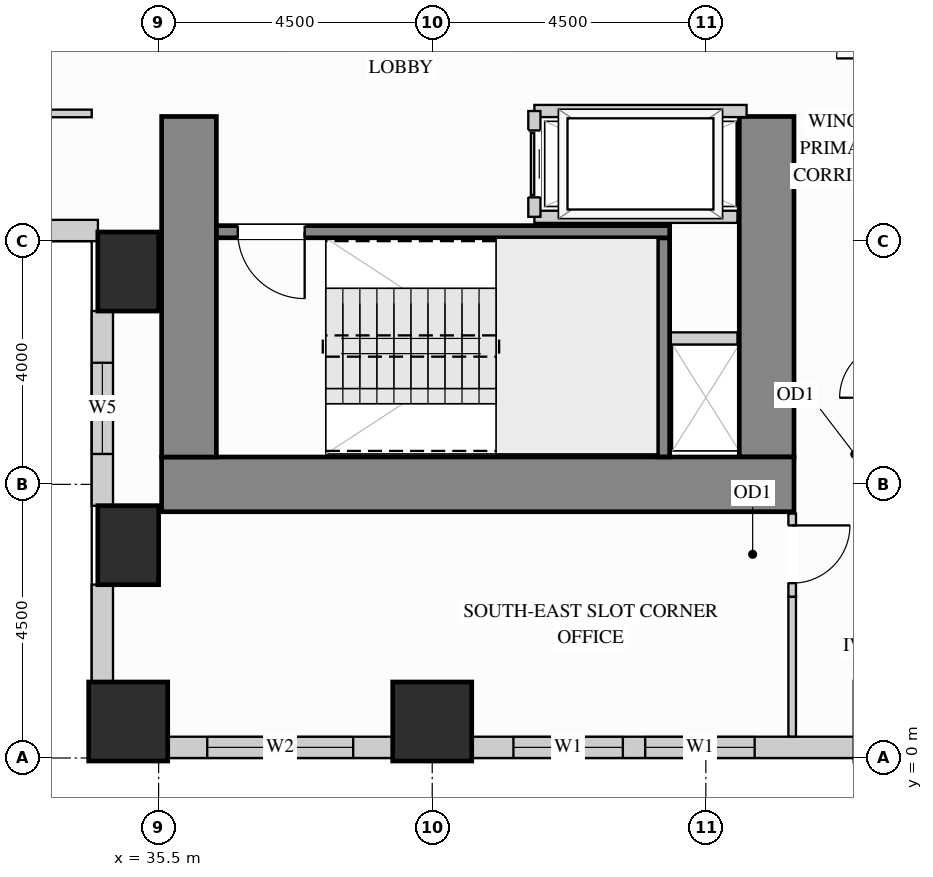
"""IFC4 building model, lengths in metres.
Left out: names, types, materials, properties, quantities, classifications, styles, units other than length and angle.
Written with IfcOpenShell. Run it as: python <this file> out.ifc"""

import sys

from ifc_helpers import new_model, si_unit, direction, frame, frame_2d, origin, origin_2d, place, context, subcontext, project, spatial, rectangle, extrude, source, transform, mapped, element, fill, save


model = new_model("IFC4")
c1 = context("Model", 3, precision=1e-05, world=origin(), true_north=direction((0.0, 1.0)))
c2 = subcontext(c1, "Body", "Model", "MODEL_VIEW")
j1 = project(units=[si_unit("LENGTHUNIT", "METRE"), si_unit("PLANEANGLEUNIT", "RADIAN")], contexts=[c1])
p1 = place(None, origin())
s1 = spatial("IfcSite", under=j1, at=p1, CompositionType="ELEMENT")
p2 = place(p1, origin())
s2 = spatial("IfcBuilding", under=s1, at=p2, CompositionType="ELEMENT")
p3 = place(p2, frame((0.0, 0.0, 22.5)))
s3 = spatial("IfcBuildingStorey", under=s2, at=p3, CompositionType="ELEMENT", Elevation=22.5)
m1 = source(origin(), c2, "Body", "SweptSolid", [
    extrude(rectangle(XDim=1.0, YDim=1.3, at=origin_2d()), origin(), (0.0, 0.0, 1.0), 3.38),
])
for number, where, z_axis, x_axis in (
    (1, (35.0, 3.5, 0.0), (0.0, 0.0, 1.0), (1.0, 0.0, 0.0)),
    (2, (35.0, 8.0, 0.0), (0.0, 0.0, 1.0), (1.0, 0.0, 0.0)),
):
    element("IfcColumn", number, at=place(p3, frame(where, z_axis=z_axis, x_axis=x_axis)), inside=s3, PredefinedType="COLUMN", context=c2, shape_type="MappedRepresentation", body=[
        mapped(m1, transform((0.0, 0.0, 0.0), x_axis=(1.0, 0.0, 0.0), y_axis=(0.0, 1.0, 0.0), z_axis=(0.0, 0.0, 1.0))),
    ])
m2 = source(origin(), c2, "Body", "SweptSolid", [
    extrude(rectangle(XDim=1.3, YDim=1.3, at=origin_2d()), origin(), (0.0, 0.0, 1.0), 3.38),
])
for number, where, z_axis, x_axis in (
    (3, (35.0, 0.6, 0.0), (0.0, 0.0, 1.0), (1.0, 0.0, 0.0)),
    (4, (40.0, 0.6, 0.0), (0.0, 0.0, 1.0), (1.0, 0.0, 0.0)),
):
    element("IfcColumn", number, at=place(p3, frame(where, z_axis=z_axis, x_axis=x_axis)), inside=s3, PredefinedType="COLUMN", context=c2, shape_type="MappedRepresentation", body=[
        mapped(m2, transform((0.0, 0.0, 0.0), x_axis=(1.0, 0.0, 0.0), y_axis=(0.0, 1.0, 0.0), z_axis=(0.0, 0.0, 1.0))),
    ])
m3 = source(origin(), c2, "Body", "SweptSolid", [
    extrude(rectangle(XDim=5.6, YDim=0.9, at=frame_2d((2.8, 0.0))), origin(), (0.0, 0.0, 1.0), 3.38),
])
p4 = place(p3, frame((45.5, 4.95, 0.0), z_axis=(0.0, 0.0, 1.0), x_axis=(0.0, 1.0, 0.0)))
e5 = element("IfcWall", 5, at=p4, inside=s3, PredefinedType="SHEAR", context=c2, shape_type="MappedRepresentation", body=[
    mapped(m3, transform((0.0, 0.0, 0.0), x_axis=(1.0, 0.0, 0.0), y_axis=(0.0, 1.0, 0.0), z_axis=(0.0, 0.0, 1.0))),
])
m4 = source(origin(), c2, "Body", "SweptSolid", [
    extrude(rectangle(XDim=10.4, YDim=0.9, at=frame_2d((5.2, 0.0))), origin(), (0.0, 0.0, 1.0), 3.38),
])
p5 = place(p3, frame((35.55, 4.5, 0.0), z_axis=(0.0, 0.0, 1.0), x_axis=(1.0, 0.0, 0.0)))
e6 = element("IfcWall", 6, at=p5, inside=s3, PredefinedType="SHEAR", context=c2, shape_type="MappedRepresentation", body=[
    mapped(m4, transform((0.0, 0.0, 0.0), x_axis=(1.0, 0.0, 0.0), y_axis=(0.0, 1.0, 0.0), z_axis=(0.0, 0.0, 1.0))),
])
p6 = place(p3, frame((36.0, 4.95, 0.0), z_axis=(0.0, 0.0, 1.0), x_axis=(0.0, 1.0, 0.0)))
e7 = element("IfcWall", 7, at=p6, inside=s3, PredefinedType="SHEAR", context=c2, shape_type="MappedRepresentation", body=[
    mapped(m3, transform((0.0, 0.0, 0.0), x_axis=(1.0, 0.0, 0.0), y_axis=(0.0, 1.0, 0.0), z_axis=(0.0, 0.0, 1.0))),
])
p7 = place(p3, frame((30.998, 8.675, 0.0), z_axis=(0.0, 0.0, 1.0), x_axis=(1.0, 0.0, 0.0)))
e8 = element("IfcWall", 8, at=p7, inside=s3, PredefinedType="SOLIDWALL", context=c2, shape_type="SweptSolid", body=[
    extrude(rectangle(XDim=3.504, YDim=0.35, at=frame_2d((1.752, 0.0))), origin(), (0.0, 0.0, 1.0), 3.365),
])
p8 = place(p7, frame((1.002, 0.0, 0.78)))
e9 = element("IfcOpeningElement", 9, at=p8, cuts=e8, PredefinedType="OPENING", context=c2, shape_type="SweptSolid", body=[
    extrude(rectangle(XDim=1.5, YDim=2.0, at=frame_2d((0.75, 1.0))), frame((0.0, 0.185, 0.0), z_axis=(0.0, -1.0, 0.0), x_axis=(1.0, 0.0, 0.0)), (0.0, 0.0, 1.0), 0.37),
])
p9 = place(p3, frame((34.575, 7.352, 0.0), z_axis=(0.0, 0.0, 1.0), x_axis=(0.0, -1.0, 0.0)))
e10 = element("IfcWall", 10, at=p9, inside=s3, PredefinedType="SOLIDWALL", context=c2, shape_type="SweptSolid", body=[
    extrude(rectangle(XDim=3.204, YDim=0.35, at=frame_2d((1.602, 0.0))), origin(), (0.0, 0.0, 1.0), 2.51),
])
p10 = place(p9, frame((0.852, 0.0, 0.78)))
e11 = element("IfcOpeningElement", 11, at=p10, cuts=e10, PredefinedType="OPENING", context=c2, shape_type="SweptSolid", body=[
    extrude(rectangle(XDim=1.5, YDim=1.55, at=frame_2d((0.75, 0.775))), frame((0.0, 0.185, 0.0), z_axis=(0.0, -1.0, 0.0), x_axis=(1.0, 0.0, 0.0)), (0.0, 0.0, 1.0), 0.37),
])
m5 = source(origin(), c2, "Body", "SweptSolid", [
    extrude(rectangle(XDim=1.604, YDim=0.35, at=frame_2d((0.802, 0.0))), origin(), (0.0, 0.0, 1.0), 2.51),
])
p11 = place(p3, frame((34.575, 2.852, 0.0), z_axis=(0.0, 0.0, 1.0), x_axis=(0.0, -1.0, 0.0)))
e12 = element("IfcWall", 12, at=p11, inside=s3, PredefinedType="SOLIDWALL", context=c2, shape_type="MappedRepresentation", body=[
    mapped(m5, transform((0.0, 0.0, 0.0), x_axis=(1.0, 0.0, 0.0), y_axis=(0.0, 1.0, 0.0), z_axis=(0.0, 0.0, 1.0))),
])
p12 = place(p3, frame((35.648, 0.175, 0.0), z_axis=(0.0, 0.0, 1.0), x_axis=(1.0, 0.0, 0.0)))
e13 = element("IfcWall", 13, at=p12, inside=s3, PredefinedType="SOLIDWALL", context=c2, shape_type="SweptSolid", body=[
    extrude(rectangle(XDim=3.704, YDim=0.35, at=frame_2d((1.852, 0.0))), origin(), (0.0, 0.0, 1.0), 2.51),
])
p13 = place(p12, frame((0.652, 0.0, 0.78)))
e14 = element("IfcOpeningElement", 14, at=p13, cuts=e13, PredefinedType="OPENING", context=c2, shape_type="SweptSolid", body=[
    extrude(rectangle(XDim=2.4, YDim=1.55, at=frame_2d((1.2, 0.775))), frame((0.0, 0.185, 0.0), z_axis=(0.0, -1.0, 0.0), x_axis=(1.0, 0.0, 0.0)), (0.0, 0.0, 1.0), 0.37),
])
p14 = place(p3, frame((40.648, 0.175, 0.0), z_axis=(0.0, 0.0, 1.0), x_axis=(1.0, 0.0, 0.0)))
e15 = element("IfcWall", 15, at=p14, inside=s3, PredefinedType="SOLIDWALL", context=c2, shape_type="SweptSolid", body=[
    extrude(rectangle(XDim=6.304, YDim=0.35, at=frame_2d((3.152, 0.0))), origin(), (0.0, 0.0, 1.0), 2.51),
])
p15 = place(p14, frame((0.687, 0.0, 0.78)))
e16 = element("IfcOpeningElement", 16, at=p15, cuts=e15, PredefinedType="OPENING", context=c2, shape_type="SweptSolid", body=[
    extrude(rectangle(XDim=1.8, YDim=1.55, at=frame_2d((0.9, 0.775))), frame((0.0, 0.185, 0.0), z_axis=(0.0, -1.0, 0.0), x_axis=(1.0, 0.0, 0.0)), (0.0, 0.0, 1.0), 0.37),
])
p16 = place(p14, frame((2.855, 0.0, 0.78)))
e17 = element("IfcOpeningElement", 17, at=p16, cuts=e15, PredefinedType="OPENING", context=c2, shape_type="SweptSolid", body=[
    extrude(rectangle(XDim=1.8, YDim=1.55, at=frame_2d((0.9, 0.775))), frame((0.0, 0.185, 0.0), z_axis=(0.0, -1.0, 0.0), x_axis=(1.0, 0.0, 0.0)), (0.0, 0.0, 1.0), 0.37),
])
p17 = place(p3, frame((45.92, 2.65, 0.0), z_axis=(0.0, 0.0, 1.0), x_axis=(0.0, 1.0, 0.0)))
e18 = element("IfcWall", 18, at=p17, inside=s3, PredefinedType="PARTITIONING", context=c2, shape_type="SweptSolid", body=[
    extrude(rectangle(XDim=1.37, YDim=0.125, at=frame_2d((0.685, 0.0))), origin(), (0.0, 0.0, 1.0), 3.365),
])
p18 = place(p17, frame((0.225, 0.0, 0.0)))
e19 = element("IfcOpeningElement", 19, at=p18, cuts=e18, PredefinedType="OPENING", context=c2, shape_type="SweptSolid", body=[
    extrude(rectangle(XDim=0.95, YDim=2.15, at=frame_2d((0.475, 1.075))), frame((0.0, 0.073, 0.0), z_axis=(0.0, -1.0, 0.0), x_axis=(1.0, 0.0, 0.0)), (0.0, 0.0, 1.0), 0.145),
])
m6 = source(origin(), c2, "Body", "SweptSolid", [
    extrude(rectangle(XDim=2.298, YDim=0.125, at=frame_2d((1.149, 0.0))), origin(), (0.0, 0.0, 1.0), 3.365),
])
p19 = place(p3, frame((45.92, 0.352, 0.0), z_axis=(0.0, 0.0, 1.0), x_axis=(0.0, 1.0, 0.0)))
e20 = element("IfcWall", 20, at=p19, inside=s3, PredefinedType="PARTITIONING", context=c2, shape_type="MappedRepresentation", body=[
    mapped(m6, transform((0.0, 0.0, 0.0), x_axis=(1.0, 0.0, 0.0), y_axis=(0.0, 1.0, 0.0), z_axis=(0.0, 0.0, 1.0))),
])
p20 = place(p3, frame((19.5, 10.6, 0.0), z_axis=(0.0, 0.0, 1.0), x_axis=(1.0, 0.0, 0.0)))
e21 = element("IfcWall", 21, at=p20, inside=s3, PredefinedType="PARTITIONING", context=c2, shape_type="SweptSolid", body=[
    extrude(rectangle(XDim=14.9, YDim=0.125, at=frame_2d((7.45, 0.0))), origin(), (0.0, 0.0, 1.0), 3.365),
])
p21 = place(p20, frame((6.975, 0.0, 0.0)))
e22 = element("IfcOpeningElement", 22, at=p21, cuts=e21, PredefinedType="OPENING", context=c2, shape_type="SweptSolid", body=[
    extrude(rectangle(XDim=0.95, YDim=2.15, at=frame_2d((0.475, 1.075))), frame((0.0, 0.073, 0.0), z_axis=(0.0, -1.0, 0.0), x_axis=(1.0, 0.0, 0.0)), (0.0, 0.0, 1.0), 0.145),
])
m7 = source(origin(), c2, "Body", "SweptSolid", [
    extrude(rectangle(XDim=1.17, YDim=0.2, at=frame_2d((0.585, 0.0))), origin(), (0.0, 0.0, 1.0), 3.365),
])
p22 = place(p3, frame((43.85, 6.9, 0.0), z_axis=(0.0, 0.0, 1.0), x_axis=(1.0, 0.0, 0.0)))
e23 = element("IfcWall", 23, at=p22, inside=s3, PredefinedType="PARTITIONING", context=c2, shape_type="MappedRepresentation", body=[
    mapped(m7, transform((0.0, 0.0, 0.0), x_axis=(1.0, 0.0, 0.0), y_axis=(0.0, 1.0, 0.0), z_axis=(0.0, 0.0, 1.0))),
])
m8 = source(origin(), c2, "Body", "SweptSolid", [
    extrude(rectangle(XDim=3.49, YDim=0.2, at=frame_2d((1.745, 0.0))), origin(), (0.0, 0.0, 1.0), 3.365),
])
p23 = place(p3, frame((41.68, 10.64, 0.0), z_axis=(0.0, 0.0, 1.0), x_axis=(1.0, 0.0, 0.0)))
e24 = element("IfcWall", 24, at=p23, inside=s3, PredefinedType="PARTITIONING", context=c2, shape_type="MappedRepresentation", body=[
    mapped(m8, transform((0.0, 0.0, 0.0), x_axis=(1.0, 0.0, 0.0), y_axis=(0.0, 1.0, 0.0), z_axis=(0.0, 0.0, 1.0))),
])
m9 = source(origin(), c2, "Body", "SweptSolid", [
    extrude(rectangle(XDim=3.34, YDim=0.2, at=frame_2d((1.67, 0.0))), origin(), (0.0, 0.0, 1.0), 3.365),
])
p24 = place(p3, frame((41.68, 8.9, 0.0), z_axis=(0.0, 0.0, 1.0), x_axis=(1.0, 0.0, 0.0)))
e25 = element("IfcWall", 25, at=p24, inside=s3, PredefinedType="PARTITIONING", context=c2, shape_type="MappedRepresentation", body=[
    mapped(m9, transform((0.0, 0.0, 0.0), x_axis=(1.0, 0.0, 0.0), y_axis=(0.0, 1.0, 0.0), z_axis=(0.0, 0.0, 1.0))),
])
p25 = place(p3, frame((41.68, 8.9, 0.0), z_axis=(0.0, 0.0, 1.0), x_axis=(0.0, 1.0, 0.0)))
e26 = element("IfcWall", 26, at=p25, inside=s3, PredefinedType="PARTITIONING", context=c2, shape_type="SweptSolid", body=[
    extrude(rectangle(XDim=1.74, YDim=0.2, at=frame_2d((0.87, 0.0))), origin(), (0.0, 0.0, 1.0), 3.365),
])
p26 = place(p25, frame((0.32, 0.0, 0.0)))
e27 = element("IfcOpeningElement", 27, at=p26, cuts=e26, PredefinedType="OPENING", context=c2, shape_type="SweptSolid", body=[
    extrude(rectangle(XDim=1.1, YDim=2.2, at=frame_2d((0.55, 1.1))), frame((0.0, 0.11, 0.0), z_axis=(0.0, -1.0, 0.0), x_axis=(1.0, 0.0, 0.0)), (0.0, 0.0, 1.0), 0.22),
])
m10 = source(origin(), c2, "Body", "SweptSolid", [
    extrude(rectangle(XDim=3.603, YDim=0.2, at=frame_2d((1.802, 0.0))), origin(), (0.0, 0.0, 1.0), 3.38),
])
p27 = place(p3, frame((43.805, 4.952, 0.0), z_axis=(0.0, 0.0, 1.0), x_axis=(0.0, 1.0, 0.0)))
e28 = element("IfcWall", 28, at=p27, inside=s3, PredefinedType="SHEAR", context=c2, shape_type="MappedRepresentation", body=[
    mapped(m10, transform((0.0, 0.0, 0.0), x_axis=(1.0, 0.0, 0.0), y_axis=(0.0, 1.0, 0.0), z_axis=(0.0, 0.0, 1.0))),
])
p28 = place(p3, frame((36.452, 8.655, 0.0), z_axis=(0.0, 0.0, 1.0), x_axis=(1.0, 0.0, 0.0)))
e29 = element("IfcWall", 29, at=p28, inside=s3, PredefinedType="SHEAR", context=c2, shape_type="SweptSolid", body=[
    extrude(rectangle(XDim=7.453, YDim=0.2, at=frame_2d((3.727, 0.0))), origin(), (0.0, 0.0, 1.0), 3.38),
])
p29 = place(p28, frame((0.35, 0.0, 0.0)))
e30 = element("IfcOpeningElement", 30, at=p29, cuts=e29, PredefinedType="OPENING", context=c2, shape_type="SweptSolid", body=[
    extrude(rectangle(XDim=1.1, YDim=2.15, at=frame_2d((0.55, 1.075))), frame((0.0, 0.11, 0.0), z_axis=(0.0, -1.0, 0.0), x_axis=(1.0, 0.0, 0.0)), (0.0, 0.0, 1.0), 0.22),
])
m11 = source(origin(), c2, "Body", "SweptSolid", [
    extrude(rectangle(XDim=1.1, YDim=2.2, at=frame_2d((0.55, 1.1))), frame((0.0, 0.025, 0.0), z_axis=(0.0, -1.0, 0.0), x_axis=(1.0, 0.0, 0.0)), (0.0, 0.0, 1.0), 0.05),
])
p30 = place(p26, origin())
e31 = element("IfcDoor", 31, at=p30, inside=s3, OperationType="SLIDING_TO_LEFT", PredefinedType="DOOR", context=c2, shape_type="MappedRepresentation", body=[
    mapped(m11, transform((0.0, 0.0, 0.0), x_axis=(1.0, 0.0, 0.0), y_axis=(0.0, 1.0, 0.0), z_axis=(0.0, 0.0, 1.0))),
])
fill(e27, e31)
m12 = source(origin(), c2, "Body", "SweptSolid", [
    extrude(rectangle(XDim=0.95, YDim=2.15, at=frame_2d((0.475, 1.075))), frame((0.0, 0.025, 0.0), z_axis=(0.0, -1.0, 0.0), x_axis=(1.0, 0.0, 0.0)), (0.0, 0.0, 1.0), 0.05),
])
p31 = place(p18, origin())
e32 = element("IfcDoor", 32, at=p31, inside=s3, OperationType="SINGLE_SWING_RIGHT", PredefinedType="DOOR", context=c2, shape_type="MappedRepresentation", body=[
    mapped(m12, transform((0.0, 0.0, 0.0), x_axis=(1.0, 0.0, 0.0), y_axis=(0.0, 1.0, 0.0), z_axis=(0.0, 0.0, 1.0))),
])
fill(e19, e32)
m13 = source(origin(), c2, "Body", "SweptSolid", [
    extrude(rectangle(XDim=1.1, YDim=2.15, at=frame_2d((0.55, 1.075))), frame((0.0, 0.025, 0.0), z_axis=(0.0, -1.0, 0.0), x_axis=(1.0, 0.0, 0.0)), (0.0, 0.0, 1.0), 0.05),
])
p32 = place(p29, origin())
e33 = element("IfcDoor", 33, at=p32, inside=s3, OperationType="SINGLE_SWING_RIGHT", PredefinedType="DOOR", context=c2, shape_type="MappedRepresentation", body=[
    mapped(m13, transform((0.0, 0.0, 0.0), x_axis=(1.0, 0.0, 0.0), y_axis=(0.0, 1.0, 0.0), z_axis=(0.0, 0.0, 1.0))),
])
fill(e30, e33)
m14 = source(origin(), c2, "Body", "SweptSolid", [
    extrude(rectangle(XDim=1.8, YDim=1.55, at=frame_2d((0.9, 0.775))), frame((0.0, 0.03, 0.0), z_axis=(0.0, -1.0, 0.0), x_axis=(1.0, 0.0, 0.0)), (0.0, 0.0, 1.0), 0.06),
])
p33 = place(p15, origin())
e34 = element("IfcWindow", 34, at=p33, inside=s3, PartitioningType="SINGLE_PANEL", PredefinedType="WINDOW", context=c2, shape_type="MappedRepresentation", body=[
    mapped(m14, transform((0.0, 0.0, 0.0), x_axis=(1.0, 0.0, 0.0), y_axis=(0.0, 1.0, 0.0), z_axis=(0.0, 0.0, 1.0))),
])
fill(e16, e34)
p34 = place(p16, origin())
e35 = element("IfcWindow", 35, at=p34, inside=s3, PartitioningType="SINGLE_PANEL", PredefinedType="WINDOW", context=c2, shape_type="MappedRepresentation", body=[
    mapped(m14, transform((0.0, 0.0, 0.0), x_axis=(1.0, 0.0, 0.0), y_axis=(0.0, 1.0, 0.0), z_axis=(0.0, 0.0, 1.0))),
])
fill(e17, e35)
m15 = source(origin(), c2, "Body", "SweptSolid", [
    extrude(rectangle(XDim=2.4, YDim=1.55, at=frame_2d((1.2, 0.775))), frame((0.0, 0.03, 0.0), z_axis=(0.0, -1.0, 0.0), x_axis=(1.0, 0.0, 0.0)), (0.0, 0.0, 1.0), 0.06),
])
p35 = place(p13, origin())
e36 = element("IfcWindow", 36, at=p35, inside=s3, PartitioningType="SINGLE_PANEL", PredefinedType="WINDOW", context=c2, shape_type="MappedRepresentation", body=[
    mapped(m15, transform((0.0, 0.0, 0.0), x_axis=(1.0, 0.0, 0.0), y_axis=(0.0, 1.0, 0.0), z_axis=(0.0, 0.0, 1.0))),
])
fill(e14, e36)
m16 = source(origin(), c2, "Body", "SweptSolid", [
    extrude(rectangle(XDim=1.5, YDim=1.55, at=frame_2d((0.75, 0.775))), frame((0.0, 0.03, 0.0), z_axis=(0.0, -1.0, 0.0), x_axis=(1.0, 0.0, 0.0)), (0.0, 0.0, 1.0), 0.06),
])
p36 = place(p10, origin())
e37 = element("IfcWindow", 37, at=p36, inside=s3, PartitioningType="SINGLE_PANEL", PredefinedType="WINDOW", context=c2, shape_type="MappedRepresentation", body=[
    mapped(m16, transform((0.0, 0.0, 0.0), x_axis=(1.0, 0.0, 0.0), y_axis=(0.0, 1.0, 0.0), z_axis=(0.0, 0.0, 1.0))),
])
fill(e11, e37)
save(model, sys.argv[1])
